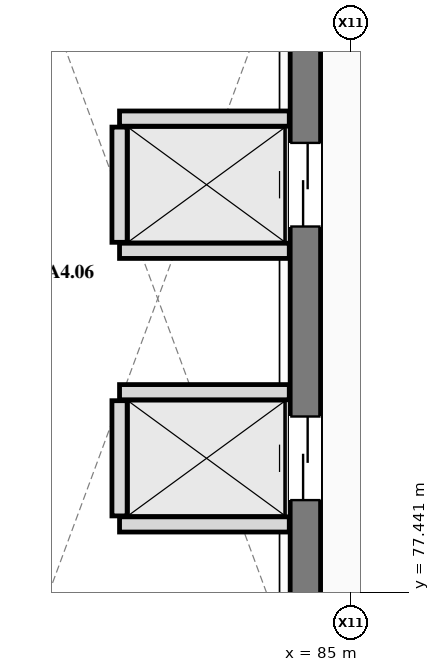
"""IFC4 building model, lengths in metres.
Left out: names, types, materials, properties, quantities, classifications, styles, units other than length and angle.
Written with IfcOpenShell. Run it as: python <this file> out.ifc"""

import sys

from ifc_helpers import new_model, si_unit, direction, frame, frame_2d, origin, place, context, subcontext, project, spatial, rectangle, extrude, element, fill, save


model = new_model("IFC4")
c1 = context("Model", 3, precision=1e-05, world=origin(), true_north=direction((0.0, 1.0)))
c2 = subcontext(c1, "Body", "Model", "MODEL_VIEW")
j1 = project(units=[si_unit("LENGTHUNIT", "METRE"), si_unit("PLANEANGLEUNIT", "RADIAN")], contexts=[c1])
p1 = place(None, origin())
s1 = spatial("IfcSite", under=j1, at=p1, CompositionType="ELEMENT")
p2 = place(p1, origin())
s2 = spatial("IfcBuilding", under=s1, at=p2, CompositionType="ELEMENT")
p3 = place(p2, frame((0.0, 0.0, 19.5)))
s3 = spatial("IfcBuildingStorey", under=s2, at=p3, CompositionType="ELEMENT", Elevation=19.5)
p4 = place(p3, frame((84.4, 76.6, 0.0), z_axis=(0.0, 0.0, 1.0), x_axis=(0.0, 1.0, 0.0)))
e1 = element("IfcWall", 1, at=p4, inside=s3, PredefinedType="SHEAR", context=c2, shape_type="SweptSolid", body=[
    extrude(rectangle(XDim=9.4, YDim=0.4, at=frame_2d((4.7, 0.0))), origin(), (0.0, 0.0, 1.0), 3.9),
])
p5 = place(p4, frame((2.05, 0.0, 0.0)))
e2 = element("IfcOpeningElement", 2, at=p5, cuts=e1, PredefinedType="OPENING", context=c2, shape_type="SweptSolid", body=[
    extrude(rectangle(XDim=1.1, YDim=2.2, at=frame_2d((0.55, 1.1))), frame((0.0, 0.21, 0.0), z_axis=(0.0, -1.0, 0.0), x_axis=(1.0, 0.0, 0.0)), (0.0, 0.0, 1.0), 0.42),
])
p6 = place(p4, frame((5.65, 0.0, 0.0)))
e3 = element("IfcOpeningElement", 3, at=p6, cuts=e1, PredefinedType="OPENING", context=c2, shape_type="SweptSolid", body=[
    extrude(rectangle(XDim=1.1, YDim=2.2, at=frame_2d((0.55, 1.1))), frame((0.0, 0.21, 0.0), z_axis=(0.0, -1.0, 0.0), x_axis=(1.0, 0.0, 0.0)), (0.0, 0.0, 1.0), 0.42),
])
for number, where, z_axis, x_axis in (
    (4, (81.955, 78.33, 0.0), (0.0, 0.0, 1.0), (1.0, 0.0, 0.0)),
    (5, (81.955, 80.07, 0.0), (0.0, 0.0, 1.0), (1.0, 0.0, 0.0)),
):
    element("IfcWall", number, at=place(p3, frame(where, z_axis=z_axis, x_axis=x_axis)), inside=s3, PredefinedType="PLUMBINGWALL", context=c2, shape_type="SweptSolid", body=[
        extrude(rectangle(XDim=2.233, YDim=0.2, at=frame_2d((1.116, 0.0))), origin(), (0.0, 0.0, 1.0), 3.585),
    ])
p7 = place(p3, frame((81.955, 78.442, 0.0), z_axis=(0.0, 0.0, 1.0), x_axis=(0.0, 1.0, 0.0)))
e6 = element("IfcWall", 6, at=p7, inside=s3, PredefinedType="PLUMBINGWALL", context=c2, shape_type="SweptSolid", body=[
    extrude(rectangle(XDim=1.516, YDim=0.2, at=frame_2d((0.758, 0.0))), origin(), (0.0, 0.0, 1.0), 3.585),
])
for number, where, z_axis, x_axis in (
    (7, (81.955, 81.93, 0.0), (0.0, 0.0, 1.0), (1.0, 0.0, 0.0)),
    (8, (81.955, 83.67, 0.0), (0.0, 0.0, 1.0), (1.0, 0.0, 0.0)),
):
    element("IfcWall", number, at=place(p3, frame(where, z_axis=z_axis, x_axis=x_axis)), inside=s3, PredefinedType="PLUMBINGWALL", context=c2, shape_type="SweptSolid", body=[
        extrude(rectangle(XDim=2.233, YDim=0.2, at=frame_2d((1.116, 0.0))), origin(), (0.0, 0.0, 1.0), 3.585),
    ])
p8 = place(p3, frame((81.955, 82.042, 0.0), z_axis=(0.0, 0.0, 1.0), x_axis=(0.0, 1.0, 0.0)))
e9 = element("IfcWall", 9, at=p8, inside=s3, PredefinedType="PLUMBINGWALL", context=c2, shape_type="SweptSolid", body=[
    extrude(rectangle(XDim=1.516, YDim=0.2, at=frame_2d((0.758, 0.0))), origin(), (0.0, 0.0, 1.0), 3.585),
])
p9 = place(p5, origin())
e10 = element("IfcDoor", 10, at=p9, inside=s3, OperationType="SLIDING_TO_LEFT", PredefinedType="DOOR", context=c2, shape_type="SweptSolid", body=[
    extrude(rectangle(XDim=1.1, YDim=2.2, at=frame_2d((0.55, 1.1))), frame((0.0, 0.025, 0.0), z_axis=(0.0, -1.0, 0.0), x_axis=(1.0, 0.0, 0.0)), (0.0, 0.0, 1.0), 0.05),
])
fill(e2, e10)
p10 = place(p6, origin())
e11 = element("IfcDoor", 11, at=p10, inside=s3, OperationType="SLIDING_TO_RIGHT", PredefinedType="DOOR", context=c2, shape_type="SweptSolid", body=[
    extrude(rectangle(XDim=1.1, YDim=2.2, at=frame_2d((0.55, 1.1))), frame((0.0, 0.025, 0.0), z_axis=(0.0, -1.0, 0.0), x_axis=(1.0, 0.0, 0.0)), (0.0, 0.0, 1.0), 0.05),
])
fill(e3, e11)
save(model, sys.argv[1])
